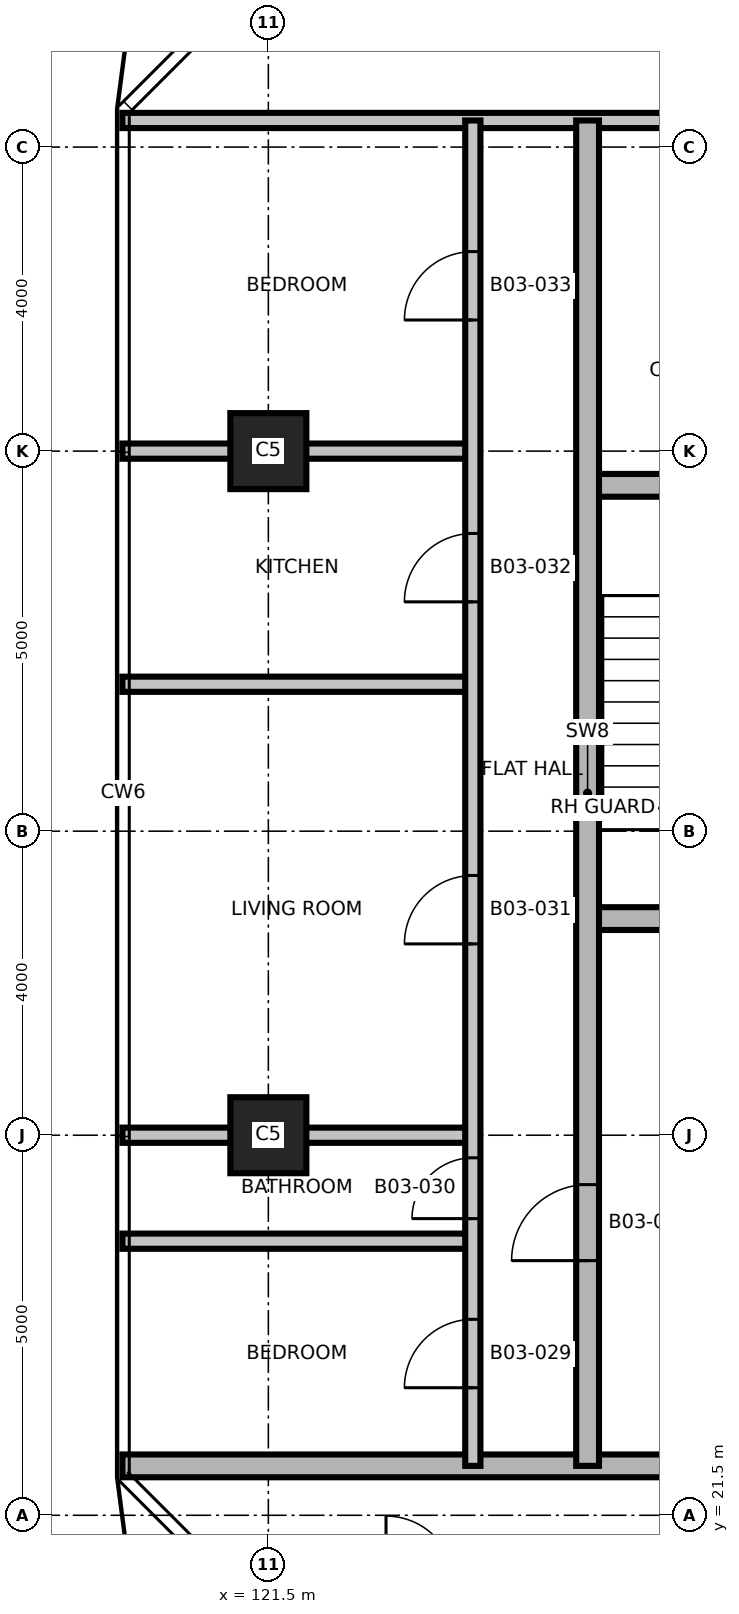
"""IFC4 building model, lengths in metres.
Left out: names, types, materials, properties, quantities, classifications, styles, units other than length and angle.
Written with IfcOpenShell. Run it as: python <this file> out.ifc"""

import sys

from ifc_helpers import new_model, si_unit, direction, frame, frame_2d, origin, origin_2d, place, context, subcontext, project, spatial, rectangle, extrude, element, fill, save


model = new_model("IFC4")
c1 = context("Model", 3, precision=1e-05, world=origin(), true_north=direction((0.0, 1.0)))
c2 = subcontext(c1, "Body", "Model", "MODEL_VIEW")
j1 = project(units=[si_unit("LENGTHUNIT", "METRE"), si_unit("PLANEANGLEUNIT", "RADIAN")], contexts=[c1])
p1 = place(None, origin())
s1 = spatial("IfcSite", under=j1, at=p1, CompositionType="ELEMENT")
p2 = place(p1, origin())
s2 = spatial("IfcBuilding", under=s1, at=p2, CompositionType="ELEMENT")
p3 = place(p2, frame((0.0, 0.0, 52.0)))
s3 = spatial("IfcBuildingStorey", under=s2, at=p3, CompositionType="ELEMENT", Elevation=52.0)
for number, where, z_axis, x_axis in (
    (1, (121.5, 26.5, 0.0), (0.0, 0.0, 1.0), (1.0, 0.0, 0.0)),
    (2, (121.5, 35.5, 0.0), (0.0, 0.0, 1.0), (1.0, 0.0, 0.0)),
):
    element("IfcColumn", number, at=place(p3, frame(where, z_axis=z_axis, x_axis=x_axis)), inside=s3, PredefinedType="COLUMN", context=c2, shape_type="SweptSolid", body=[
        extrude(rectangle(XDim=1.0, YDim=1.0, at=origin_2d()), origin(), (0.0, 0.0, 1.0), 3.7),
    ])
p4 = place(p3, frame((119.58, 22.15, 0.0), z_axis=(0.0, 0.0, 1.0), x_axis=(1.0, 0.0, 0.0)))
e3 = element("IfcWall", 3, at=p4, inside=s3, PredefinedType="SHEAR", context=c2, shape_type="SweptSolid", body=[
    extrude(rectangle(XDim=33.84, YDim=0.3, at=frame_2d((16.92, 0.0))), origin(), (0.0, 0.0, 1.0), 3.4),
])
p5 = place(p4, frame((23.17, 0.0, 0.0)))
e4 = element("IfcOpeningElement", 4, at=p5, cuts=e3, PredefinedType="OPENING", context=c2, shape_type="SweptSolid", body=[
    extrude(rectangle(XDim=1.0, YDim=2.1, at=frame_2d((0.5, 1.05))), frame((0.0, 0.16, 0.0), z_axis=(0.0, -1.0, 0.0), x_axis=(1.0, 0.0, 0.0)), (0.0, 0.0, 1.0), 0.32),
])
p6 = place(p4, frame((11.52, 0.0, 0.0)))
e5 = element("IfcOpeningElement", 5, at=p6, cuts=e3, PredefinedType="OPENING", context=c2, shape_type="SweptSolid", body=[
    extrude(rectangle(XDim=1.0, YDim=2.1, at=frame_2d((0.5, 1.05))), frame((0.0, 0.16, 0.0), z_axis=(0.0, -1.0, 0.0), x_axis=(1.0, 0.0, 0.0)), (0.0, 0.0, 1.0), 0.32),
])
p7 = place(p4, frame((25.07, 0.0, 0.0)))
e6 = element("IfcOpeningElement", 6, at=p7, cuts=e3, PredefinedType="OPENING", context=c2, shape_type="SweptSolid", body=[
    extrude(rectangle(XDim=1.0, YDim=2.1, at=frame_2d((0.5, 1.05))), frame((0.0, 0.16, 0.0), z_axis=(0.0, -1.0, 0.0), x_axis=(1.0, 0.0, 0.0)), (0.0, 0.0, 1.0), 0.32),
])
p8 = place(p4, frame((17.17, 0.0, 0.0)))
e7 = element("IfcOpeningElement", 7, at=p8, cuts=e3, PredefinedType="OPENING", context=c2, shape_type="SweptSolid", body=[
    extrude(rectangle(XDim=0.9, YDim=2.1, at=frame_2d((0.45, 1.05))), frame((0.0, 0.16, 0.0), z_axis=(0.0, -1.0, 0.0), x_axis=(1.0, 0.0, 0.0)), (0.0, 0.0, 1.0), 0.32),
])
for number, where, z_axis, x_axis in (
    (8, (119.58, 25.106, 0.0), (0.0, 0.0, 1.0), (1.0, 0.0, 0.0)),
    (9, (119.58, 26.5, 0.0), (0.0, 0.0, 1.0), (1.0, 0.0, 0.0)),
):
    element("IfcWall", number, at=place(p3, frame(where, z_axis=z_axis, x_axis=x_axis)), inside=s3, PredefinedType="PARTITIONING", context=c2, shape_type="SweptSolid", body=[
        extrude(rectangle(XDim=4.61, YDim=0.2, at=frame_2d((2.305, 0.0))), origin(), (0.0, 0.0, 1.0), 3.4),
    ])
p9 = place(p3, frame((125.7, 29.35, 0.0), z_axis=(0.0, 0.0, 1.0), x_axis=(1.0, 0.0, 0.0)))
e10 = element("IfcWall", 10, at=p9, inside=s3, PredefinedType="SHEAR", context=c2, shape_type="SweptSolid", body=[
    extrude(rectangle(XDim=2.83, YDim=0.3, at=frame_2d((1.415, 0.0))), origin(), (0.0, 0.0, 1.0), 3.4),
])
p10 = place(p9, frame((0.975, 0.0, 0.0)))
e11 = element("IfcOpeningElement", 11, at=p10, cuts=e10, PredefinedType="OPENING", context=c2, shape_type="SweptSolid", body=[
    extrude(rectangle(XDim=1.2, YDim=2.1, at=frame_2d((0.6, 1.05))), frame((0.0, 0.16, 0.0), z_axis=(0.0, -1.0, 0.0), x_axis=(1.0, 0.0, 0.0)), (0.0, 0.0, 1.0), 0.32),
])
p11 = place(p3, frame((119.58, 32.433, 0.0), z_axis=(0.0, 0.0, 1.0), x_axis=(1.0, 0.0, 0.0)))
e12 = element("IfcWall", 12, at=p11, inside=s3, PredefinedType="PARTITIONING", context=c2, shape_type="SweptSolid", body=[
    extrude(rectangle(XDim=4.61, YDim=0.2, at=frame_2d((2.305, 0.0))), origin(), (0.0, 0.0, 1.0), 3.4),
])
p12 = place(p3, frame((125.7, 35.05, 0.0), z_axis=(0.0, 0.0, 1.0), x_axis=(1.0, 0.0, 0.0)))
e13 = element("IfcWall", 13, at=p12, inside=s3, PredefinedType="SHEAR", context=c2, shape_type="SweptSolid", body=[
    extrude(rectangle(XDim=2.83, YDim=0.3, at=frame_2d((1.415, 0.0))), origin(), (0.0, 0.0, 1.0), 3.4),
])
p13 = place(p3, frame((119.58, 35.5, 0.0), z_axis=(0.0, 0.0, 1.0), x_axis=(1.0, 0.0, 0.0)))
e14 = element("IfcWall", 14, at=p13, inside=s3, PredefinedType="PARTITIONING", context=c2, shape_type="SweptSolid", body=[
    extrude(rectangle(XDim=4.61, YDim=0.2, at=frame_2d((2.305, 0.0))), origin(), (0.0, 0.0, 1.0), 3.4),
])
p14 = place(p3, frame((119.58, 39.85, 0.0), z_axis=(0.0, 0.0, 1.0), x_axis=(1.0, 0.0, 0.0)))
e15 = element("IfcWall", 15, at=p14, inside=s3, PredefinedType="PARTITIONING", context=c2, shape_type="SweptSolid", body=[
    extrude(rectangle(XDim=33.84, YDim=0.2, at=frame_2d((16.92, 0.0))), origin(), (0.0, 0.0, 1.0), 3.4),
])
p15 = place(p14, frame((15.27, 0.0, 0.0)))
e16 = element("IfcOpeningElement", 16, at=p15, cuts=e15, PredefinedType="OPENING", context=c2, shape_type="SweptSolid", body=[
    extrude(rectangle(XDim=1.0, YDim=2.1, at=frame_2d((0.5, 1.05))), frame((0.0, 0.11, 0.0), z_axis=(0.0, -1.0, 0.0), x_axis=(1.0, 0.0, 0.0)), (0.0, 0.0, 1.0), 0.22),
])
p16 = place(p14, frame((25.07, 0.0, 0.0)))
e17 = element("IfcOpeningElement", 17, at=p16, cuts=e15, PredefinedType="OPENING", context=c2, shape_type="SweptSolid", body=[
    extrude(rectangle(XDim=1.0, YDim=2.1, at=frame_2d((0.5, 1.05))), frame((0.0, 0.11, 0.0), z_axis=(0.0, -1.0, 0.0), x_axis=(1.0, 0.0, 0.0)), (0.0, 0.0, 1.0), 0.22),
])
p17 = place(p3, frame((124.19, 22.15, 0.0), z_axis=(0.0, 0.0, 1.0), x_axis=(0.0, 1.0, 0.0)))
e18 = element("IfcWall", 18, at=p17, inside=s3, PredefinedType="PARTITIONING", context=c2, shape_type="SweptSolid", body=[
    extrude(rectangle(XDim=17.7, YDim=0.2, at=frame_2d((8.85, 0.0))), origin(), (0.0, 0.0, 1.0), 3.4),
])
p18 = place(p17, frame((1.028, 0.0, 0.0)))
e19 = element("IfcOpeningElement", 19, at=p18, cuts=e18, PredefinedType="OPENING", context=c2, shape_type="SweptSolid", body=[
    extrude(rectangle(XDim=0.9, YDim=2.1, at=frame_2d((0.45, 1.05))), frame((0.0, 0.11, 0.0), z_axis=(0.0, -1.0, 0.0), x_axis=(1.0, 0.0, 0.0)), (0.0, 0.0, 1.0), 0.22),
])
p19 = place(p17, frame((3.253, 0.0, 0.0)))
e20 = element("IfcOpeningElement", 20, at=p19, cuts=e18, PredefinedType="OPENING", context=c2, shape_type="SweptSolid", body=[
    extrude(rectangle(XDim=0.8, YDim=2.1, at=frame_2d((0.4, 1.05))), frame((0.0, 0.11, 0.0), z_axis=(0.0, -1.0, 0.0), x_axis=(1.0, 0.0, 0.0)), (0.0, 0.0, 1.0), 0.22),
])
p20 = place(p17, frame((6.867, 0.0, 0.0)))
e21 = element("IfcOpeningElement", 21, at=p20, cuts=e18, PredefinedType="OPENING", context=c2, shape_type="SweptSolid", body=[
    extrude(rectangle(XDim=0.9, YDim=2.1, at=frame_2d((0.45, 1.05))), frame((0.0, 0.11, 0.0), z_axis=(0.0, -1.0, 0.0), x_axis=(1.0, 0.0, 0.0)), (0.0, 0.0, 1.0), 0.22),
])
p21 = place(p17, frame((11.367, 0.0, 0.0)))
e22 = element("IfcOpeningElement", 22, at=p21, cuts=e18, PredefinedType="OPENING", context=c2, shape_type="SweptSolid", body=[
    extrude(rectangle(XDim=0.9, YDim=2.1, at=frame_2d((0.45, 1.05))), frame((0.0, 0.11, 0.0), z_axis=(0.0, -1.0, 0.0), x_axis=(1.0, 0.0, 0.0)), (0.0, 0.0, 1.0), 0.22),
])
p22 = place(p17, frame((15.075, 0.0, 0.0)))
e23 = element("IfcOpeningElement", 23, at=p22, cuts=e18, PredefinedType="OPENING", context=c2, shape_type="SweptSolid", body=[
    extrude(rectangle(XDim=0.9, YDim=2.1, at=frame_2d((0.45, 1.05))), frame((0.0, 0.11, 0.0), z_axis=(0.0, -1.0, 0.0), x_axis=(1.0, 0.0, 0.0)), (0.0, 0.0, 1.0), 0.22),
])
p23 = place(p3, frame((125.7, 22.15, 0.0), z_axis=(0.0, 0.0, 1.0), x_axis=(0.0, 1.0, 0.0)))
e24 = element("IfcWall", 24, at=p23, inside=s3, PredefinedType="SHEAR", context=c2, shape_type="SweptSolid", body=[
    extrude(rectangle(XDim=17.7, YDim=0.3, at=frame_2d((8.85, 0.0))), origin(), (0.0, 0.0, 1.0), 3.4),
])
p24 = place(p23, frame((2.7, 0.0, 0.0)))
e25 = element("IfcOpeningElement", 25, at=p24, cuts=e24, PredefinedType="OPENING", context=c2, shape_type="SweptSolid", body=[
    extrude(rectangle(XDim=1.0, YDim=2.1, at=frame_2d((0.5, 1.05))), frame((0.0, 0.16, 0.0), z_axis=(0.0, -1.0, 0.0), x_axis=(1.0, 0.0, 0.0)), (0.0, 0.0, 1.0), 0.32),
])
p25 = place(p24, origin())
e26 = element("IfcDoor", 26, at=p25, inside=s3, OperationType="SINGLE_SWING_RIGHT", PredefinedType="DOOR", context=c2, shape_type="SweptSolid", body=[
    extrude(rectangle(XDim=1.0, YDim=2.1, at=frame_2d((0.5, 1.05))), frame((0.0, 0.025, 0.0), z_axis=(0.0, -1.0, 0.0), x_axis=(1.0, 0.0, 0.0)), (0.0, 0.0, 1.0), 0.05),
])
fill(e25, e26)
p26 = place(p18, origin())
e27 = element("IfcDoor", 27, at=p26, inside=s3, OperationType="SINGLE_SWING_LEFT", PredefinedType="DOOR", context=c2, shape_type="SweptSolid", body=[
    extrude(rectangle(XDim=0.9, YDim=2.1, at=frame_2d((0.45, 1.05))), frame((0.0, 0.025, 0.0), z_axis=(0.0, -1.0, 0.0), x_axis=(1.0, 0.0, 0.0)), (0.0, 0.0, 1.0), 0.05),
])
fill(e19, e27)
p27 = place(p19, origin())
e28 = element("IfcDoor", 28, at=p27, inside=s3, OperationType="SINGLE_SWING_RIGHT", PredefinedType="DOOR", context=c2, shape_type="SweptSolid", body=[
    extrude(rectangle(XDim=0.8, YDim=2.1, at=frame_2d((0.4, 1.05))), frame((0.0, 0.025, 0.0), z_axis=(0.0, -1.0, 0.0), x_axis=(1.0, 0.0, 0.0)), (0.0, 0.0, 1.0), 0.05),
])
fill(e20, e28)
p28 = place(p20, origin())
e29 = element("IfcDoor", 29, at=p28, inside=s3, OperationType="SINGLE_SWING_LEFT", PredefinedType="DOOR", context=c2, shape_type="SweptSolid", body=[
    extrude(rectangle(XDim=0.9, YDim=2.1, at=frame_2d((0.45, 1.05))), frame((0.0, 0.025, 0.0), z_axis=(0.0, -1.0, 0.0), x_axis=(1.0, 0.0, 0.0)), (0.0, 0.0, 1.0), 0.05),
])
fill(e21, e29)
p29 = place(p21, origin())
e30 = element("IfcDoor", 30, at=p29, inside=s3, OperationType="SINGLE_SWING_RIGHT", PredefinedType="DOOR", context=c2, shape_type="SweptSolid", body=[
    extrude(rectangle(XDim=0.9, YDim=2.1, at=frame_2d((0.45, 1.05))), frame((0.0, 0.025, 0.0), z_axis=(0.0, -1.0, 0.0), x_axis=(1.0, 0.0, 0.0)), (0.0, 0.0, 1.0), 0.05),
])
fill(e22, e30)
p30 = place(p22, origin())
e31 = element("IfcDoor", 31, at=p30, inside=s3, OperationType="SINGLE_SWING_LEFT", PredefinedType="DOOR", context=c2, shape_type="SweptSolid", body=[
    extrude(rectangle(XDim=0.9, YDim=2.1, at=frame_2d((0.45, 1.05))), frame((0.0, 0.025, 0.0), z_axis=(0.0, -1.0, 0.0), x_axis=(1.0, 0.0, 0.0)), (0.0, 0.0, 1.0), 0.05),
])
fill(e23, e31)
save(model, sys.argv[1])
